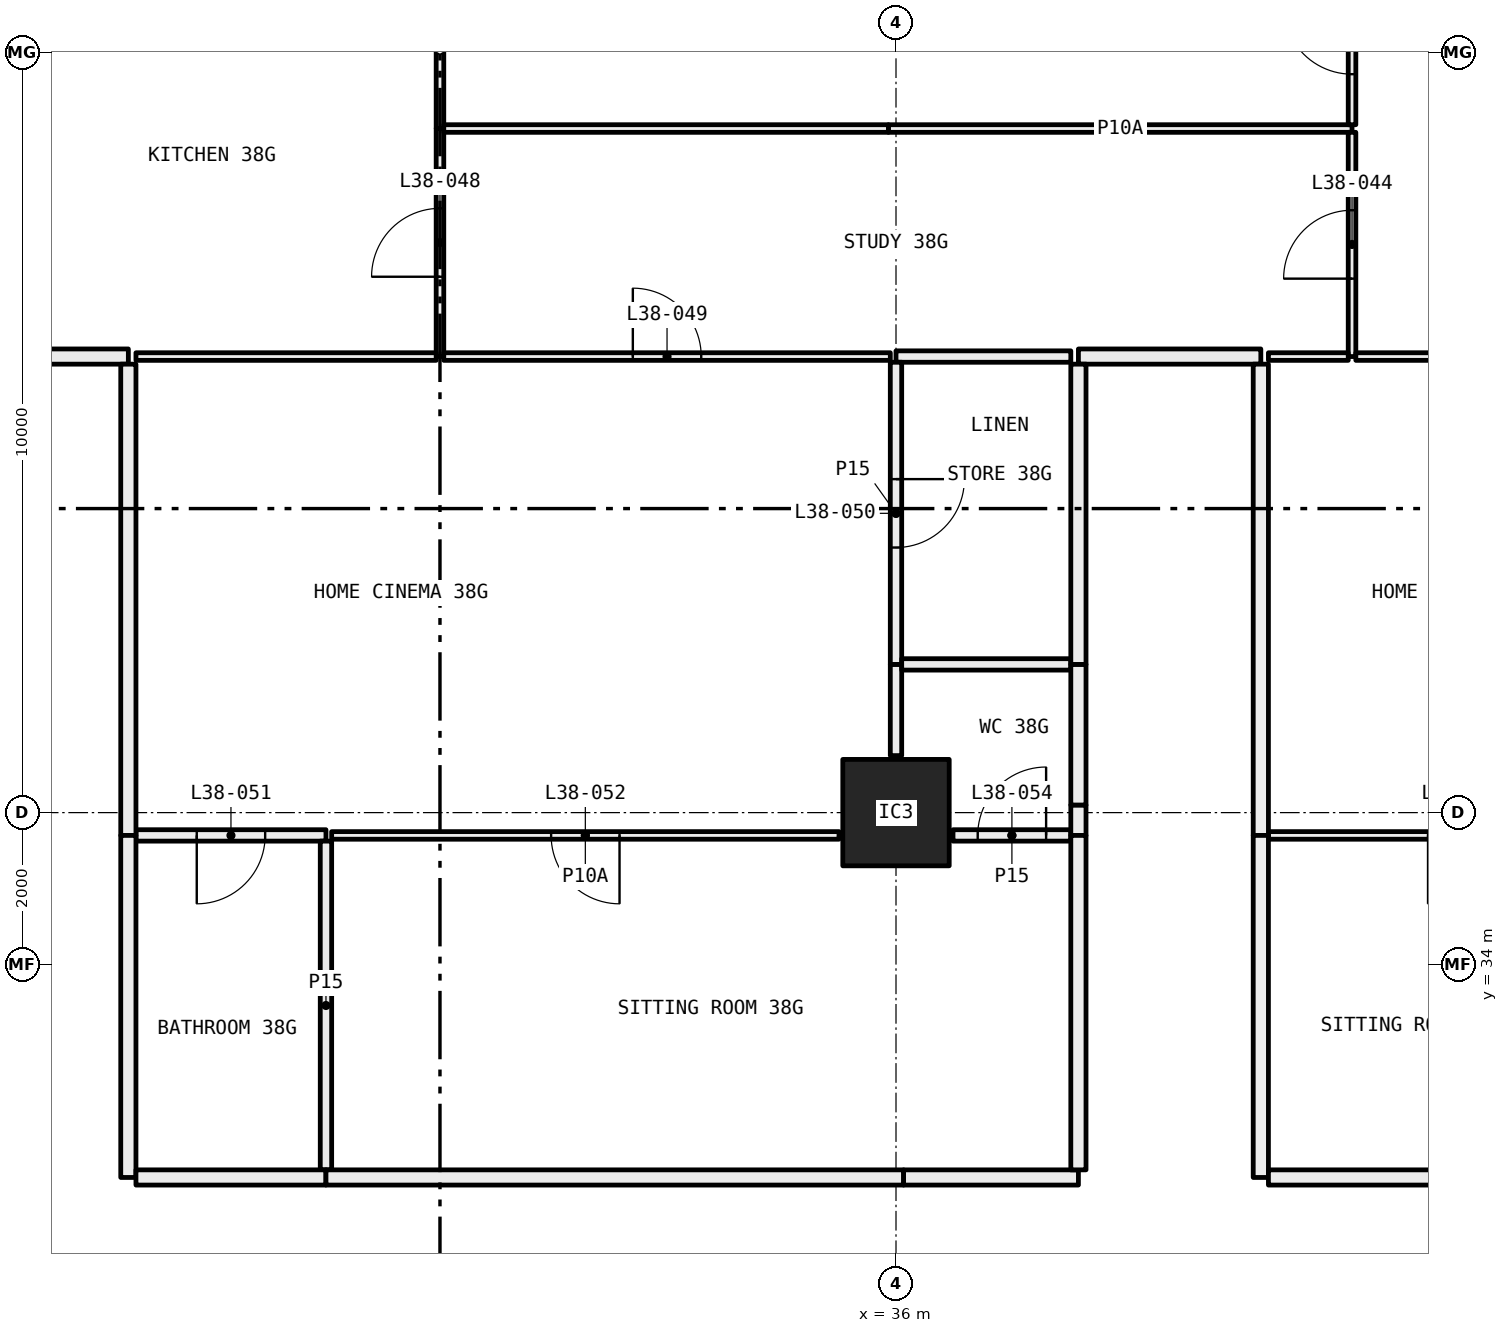
"""IFC4 building model, lengths in metres.
Left out: names, types, materials, properties, quantities, classifications, styles, units other than length and angle.
Written with IfcOpenShell. Run it as: python <this file> out.ifc"""

import sys

from ifc_helpers import new_model, si_unit, direction, frame, frame_2d, origin, origin_2d, place, context, subcontext, project, spatial, rectangle, hollow_rectangle, extrude, element, fill, save


model = new_model("IFC4")
c1 = context("Model", 3, precision=1e-05, world=origin(), true_north=direction((0.0, 1.0)))
c2 = subcontext(c1, "Body", "Model", "MODEL_VIEW")
j1 = project(units=[si_unit("LENGTHUNIT", "METRE"), si_unit("PLANEANGLEUNIT", "RADIAN")], contexts=[c1])
p1 = place(None, origin())
s1 = spatial("IfcSite", under=j1, at=p1, CompositionType="ELEMENT")
p2 = place(p1, origin())
s2 = spatial("IfcBuilding", under=s1, at=p2, CompositionType="ELEMENT")
p3 = place(p2, frame((0.0, 0.0, 144.9)))
s3 = spatial("IfcBuildingStorey", under=s2, at=p3, CompositionType="ELEMENT", Elevation=144.9)
p4 = place(p3, frame((36.0, 36.0, 0.0), z_axis=(0.0, 0.0, 1.0), x_axis=(1.0, 0.0, 0.0)))
e1 = element("IfcColumn", 1, at=p4, inside=s3, PredefinedType="COLUMN", context=c2, shape_type="SweptSolid", body=[
    extrude(hollow_rectangle(XDim=1.4, YDim=1.4, WallThickness=0.06, at=origin_2d()), origin(), (0.0, 0.0, 1.0), 3.05),
])
p5 = place(p3, frame((30.0, 42.0, 0.0), z_axis=(0.0, 0.0, 1.0), x_axis=(0.0, 1.0, 0.0)))
e2 = element("IfcWall", 2, at=p5, inside=s3, PredefinedType="PARTITIONING", context=c2, shape_type="SweptSolid", body=[
    extrude(rectangle(XDim=3.0, YDim=0.1, at=frame_2d((1.5, 0.0))), origin(), (0.0, 0.0, 1.0), 3.05),
])
p6 = place(p5, frame((1.05, 0.0, 0.0)))
e3 = element("IfcOpeningElement", 3, at=p6, cuts=e2, PredefinedType="OPENING", context=c2, shape_type="SweptSolid", body=[
    extrude(rectangle(XDim=0.9, YDim=2.1, at=frame_2d((0.45, 1.05))), frame((0.0, 0.06, 0.0), z_axis=(0.0, -1.0, 0.0), x_axis=(1.0, 0.0, 0.0)), (0.0, 0.0, 1.0), 0.12),
])
p7 = place(p3, frame((30.0, 45.0, 0.0), z_axis=(0.0, 0.0, 1.0), x_axis=(0.0, 1.0, 0.0)))
e4 = element("IfcWall", 4, at=p7, inside=s3, PredefinedType="PARTITIONING", context=c2, shape_type="SweptSolid", body=[
    extrude(rectangle(XDim=2.28, YDim=0.1, at=frame_2d((1.14, 0.0))), origin(), (0.0, 0.0, 1.0), 3.05),
])
p8 = place(p3, frame((26.0, 42.0, 0.0), z_axis=(0.0, 0.0, 1.0), x_axis=(1.0, 0.0, 0.0)))
e5 = element("IfcWall", 5, at=p8, inside=s3, PredefinedType="PARTITIONING", context=c2, shape_type="SweptSolid", body=[
    extrude(rectangle(XDim=3.95, YDim=0.1, at=frame_2d((1.975, 0.0))), origin(), (0.0, 0.0, 1.0), 3.05),
])
p9 = place(p3, frame((24.1, 42.0, 0.0), z_axis=(0.0, 0.0, 1.0), x_axis=(1.0, 0.0, 0.0)))
e6 = element("IfcWall", 6, at=p9, inside=s3, PredefinedType="PARTITIONING", context=c2, shape_type="SweptSolid", body=[
    extrude(rectangle(XDim=1.8, YDim=0.2, at=frame_2d((0.9, 0.0))), origin(), (0.0, 0.0, 1.0), 3.05),
])
p10 = place(p3, frame((42.0, 45.0, 0.0), z_axis=(0.0, 0.0, 1.0), x_axis=(-1.0, 0.0, 0.0)))
e7 = element("IfcWall", 7, at=p10, inside=s3, PredefinedType="PARTITIONING", context=c2, shape_type="SweptSolid", body=[
    extrude(rectangle(XDim=6.1, YDim=0.1, at=frame_2d((3.05, 0.0))), origin(), (0.0, 0.0, 1.0), 2.45),
])
p11 = place(p3, frame((35.9, 45.0, 0.0), z_axis=(0.0, 0.0, 1.0), x_axis=(-1.0, 0.0, 0.0)))
e8 = element("IfcWall", 8, at=p11, inside=s3, PredefinedType="PARTITIONING", context=c2, shape_type="SweptSolid", body=[
    extrude(rectangle(XDim=5.85, YDim=0.1, at=frame_2d((2.925, 0.0))), origin(), (0.0, 0.0, 1.0), 3.05),
])
p12 = place(p3, frame((42.0, 42.0, 0.0), z_axis=(0.0, 0.0, 1.0), x_axis=(0.0, 1.0, 0.0)))
e9 = element("IfcWall", 9, at=p12, inside=s3, PredefinedType="PARTITIONING", context=c2, shape_type="SweptSolid", body=[
    extrude(rectangle(XDim=2.95, YDim=0.1, at=frame_2d((1.475, 0.0))), origin(), (0.0, 0.0, 1.0), 3.05),
])
p13 = place(p12, frame((1.025, 0.0, 0.0)))
e10 = element("IfcOpeningElement", 10, at=p13, cuts=e9, PredefinedType="OPENING", context=c2, shape_type="SweptSolid", body=[
    extrude(rectangle(XDim=0.9, YDim=2.1, at=frame_2d((0.45, 1.05))), frame((0.0, 0.06, 0.0), z_axis=(0.0, -1.0, 0.0), x_axis=(1.0, 0.0, 0.0)), (0.0, 0.0, 1.0), 0.12),
])
p14 = place(p3, frame((30.05, 42.0, 0.0), z_axis=(0.0, 0.0, 1.0), x_axis=(1.0, 0.0, 0.0)))
e11 = element("IfcWall", 11, at=p14, inside=s3, PredefinedType="PARTITIONING", context=c2, shape_type="SweptSolid", body=[
    extrude(rectangle(XDim=5.875, YDim=0.1, at=frame_2d((2.938, 0.0))), origin(), (0.0, 0.0, 1.0), 2.45),
])
p15 = place(p14, frame((2.488, 0.0, 0.0)))
e12 = element("IfcOpeningElement", 12, at=p15, cuts=e11, PredefinedType="OPENING", context=c2, shape_type="SweptSolid", body=[
    extrude(rectangle(XDim=0.9, YDim=2.1, at=frame_2d((0.45, 1.05))), frame((0.0, 0.06, 0.0), z_axis=(0.0, -1.0, 0.0), x_axis=(1.0, 0.0, 0.0)), (0.0, 0.0, 1.0), 0.12),
])
p16 = place(p3, frame((36.0, 42.0, 0.0), z_axis=(0.0, 0.0, 1.0), x_axis=(1.0, 0.0, 0.0)))
e13 = element("IfcWall", 13, at=p16, inside=s3, PredefinedType="PARTITIONING", context=c2, shape_type="SweptSolid", body=[
    extrude(rectangle(XDim=2.3, YDim=0.15, at=frame_2d((1.15, 0.0))), origin(), (0.0, 0.0, 1.0), 2.45),
])
p17 = place(p3, frame((40.9, 42.0, 0.0), z_axis=(0.0, 0.0, 1.0), x_axis=(1.0, 0.0, 0.0)))
e14 = element("IfcWall", 14, at=p17, inside=s3, PredefinedType="PARTITIONING", context=c2, shape_type="SweptSolid", body=[
    extrude(rectangle(XDim=1.05, YDim=0.1, at=frame_2d((0.525, 0.0))), origin(), (0.0, 0.0, 1.0), 3.05),
])
p18 = place(p3, frame((38.4, 42.0, 0.0), z_axis=(0.0, 0.0, 1.0), x_axis=(1.0, 0.0, 0.0)))
e15 = element("IfcWall", 15, at=p18, inside=s3, PredefinedType="PARTITIONING", context=c2, shape_type="SweptSolid", body=[
    extrude(rectangle(XDim=2.4, YDim=0.2, at=frame_2d((1.2, 0.0))), origin(), (0.0, 0.0, 1.0), 3.05),
])
p19 = place(p3, frame((42.0, 45.05, 0.0), z_axis=(0.0, 0.0, 1.0), x_axis=(0.0, 1.0, 0.0)))
e16 = element("IfcWall", 16, at=p19, inside=s3, PredefinedType="PARTITIONING", context=c2, shape_type="SweptSolid", body=[
    extrude(rectangle(XDim=2.23, YDim=0.1, at=frame_2d((1.115, 0.0))), origin(), (0.0, 0.0, 1.0), 3.05),
])
p20 = place(p19, frame((0.665, 0.0, 0.0)))
e17 = element("IfcOpeningElement", 17, at=p20, cuts=e16, PredefinedType="OPENING", context=c2, shape_type="SweptSolid", body=[
    extrude(rectangle(XDim=0.9, YDim=2.1, at=frame_2d((0.45, 1.05))), frame((0.0, 0.06, 0.0), z_axis=(0.0, -1.0, 0.0), x_axis=(1.0, 0.0, 0.0)), (0.0, 0.0, 1.0), 0.12),
])
p21 = place(p3, frame((42.05, 42.0, 0.0), z_axis=(0.0, 0.0, 1.0), x_axis=(1.0, 0.0, 0.0)))
e18 = element("IfcWall", 18, at=p21, inside=s3, PredefinedType="PARTITIONING", context=c2, shape_type="SweptSolid", body=[
    extrude(rectangle(XDim=3.95, YDim=0.1, at=frame_2d((1.975, 0.0))), origin(), (0.0, 0.0, 1.0), 3.05),
])
p22 = place(p21, frame((1.525, 0.0, 0.0)))
e19 = element("IfcOpeningElement", 19, at=p22, cuts=e18, PredefinedType="OPENING", context=c2, shape_type="SweptSolid", body=[
    extrude(rectangle(XDim=0.9, YDim=2.1, at=frame_2d((0.45, 1.05))), frame((0.0, 0.06, 0.0), z_axis=(0.0, -1.0, 0.0), x_axis=(1.0, 0.0, 0.0)), (0.0, 0.0, 1.0), 0.12),
])
p23 = place(p3, frame((36.0, 36.75, 0.0), z_axis=(0.0, 0.0, 1.0), x_axis=(0.0, 1.0, 0.0)))
e20 = element("IfcWall", 20, at=p23, inside=s3, PredefinedType="PARTITIONING", context=c2, shape_type="SweptSolid", body=[
    extrude(rectangle(XDim=1.2, YDim=0.15, at=frame_2d((0.6, 0.0))), origin(), (0.0, 0.0, 1.0), 2.45),
])
p24 = place(p3, frame((36.0, 37.95, 0.0), z_axis=(0.0, 0.0, 1.0), x_axis=(0.0, 1.0, 0.0)))
e21 = element("IfcWall", 21, at=p24, inside=s3, PredefinedType="PARTITIONING", context=c2, shape_type="SweptSolid", body=[
    extrude(rectangle(XDim=3.975, YDim=0.15, at=frame_2d((1.988, 0.0))), origin(), (0.0, 0.0, 1.0), 2.45),
])
p25 = place(p24, frame((1.538, 0.0, 0.0)))
e22 = element("IfcOpeningElement", 22, at=p25, cuts=e21, PredefinedType="OPENING", context=c2, shape_type="SweptSolid", body=[
    extrude(rectangle(XDim=0.9, YDim=2.1, at=frame_2d((0.45, 1.05))), frame((0.0, 0.085, 0.0), z_axis=(0.0, -1.0, 0.0), x_axis=(1.0, 0.0, 0.0)), (0.0, 0.0, 1.0), 0.17),
])
p26 = place(p3, frame((26.0, 35.7, 0.0), z_axis=(0.0, 0.0, 1.0), x_axis=(1.0, 0.0, 0.0)))
e23 = element("IfcWall", 23, at=p26, inside=s3, PredefinedType="PARTITIONING", context=c2, shape_type="SweptSolid", body=[
    extrude(rectangle(XDim=2.5, YDim=0.15, at=frame_2d((1.25, 0.0))), origin(), (0.0, 0.0, 1.0), 3.05),
])
p27 = place(p26, frame((0.8, 0.0, 0.0)))
e24 = element("IfcOpeningElement", 24, at=p27, cuts=e23, PredefinedType="OPENING", context=c2, shape_type="SweptSolid", body=[
    extrude(rectangle(XDim=0.9, YDim=2.1, at=frame_2d((0.45, 1.05))), frame((0.0, 0.085, 0.0), z_axis=(0.0, -1.0, 0.0), x_axis=(1.0, 0.0, 0.0)), (0.0, 0.0, 1.0), 0.17),
])
p28 = place(p3, frame((28.575, 35.7, 0.0), z_axis=(0.0, 0.0, 1.0), x_axis=(1.0, 0.0, 0.0)))
e25 = element("IfcWall", 25, at=p28, inside=s3, PredefinedType="PARTITIONING", context=c2, shape_type="SweptSolid", body=[
    extrude(rectangle(XDim=6.675, YDim=0.1, at=frame_2d((3.337, 0.0))), origin(), (0.0, 0.0, 1.0), 3.05),
])
p29 = place(p28, frame((2.887, 0.0, 0.0)))
e26 = element("IfcOpeningElement", 26, at=p29, cuts=e25, PredefinedType="OPENING", context=c2, shape_type="SweptSolid", body=[
    extrude(rectangle(XDim=0.9, YDim=2.1, at=frame_2d((0.45, 1.05))), frame((0.0, 0.06, 0.0), z_axis=(0.0, -1.0, 0.0), x_axis=(1.0, 0.0, 0.0)), (0.0, 0.0, 1.0), 0.12),
])
p30 = place(p3, frame((25.9, 41.9, 0.0), z_axis=(0.0, 0.0, 1.0), x_axis=(0.0, -1.0, 0.0)))
e27 = element("IfcWall", 27, at=p30, inside=s3, PredefinedType="PARTITIONING", context=c2, shape_type="SweptSolid", body=[
    extrude(rectangle(XDim=6.2, YDim=0.2, at=frame_2d((3.1, 0.0))), origin(), (0.0, 0.0, 1.0), 2.45),
])
p31 = place(p3, frame((38.3, 37.95, 0.0), z_axis=(0.0, 0.0, 1.0), x_axis=(-1.0, 0.0, 0.0)))
e28 = element("IfcWall", 28, at=p31, inside=s3, PredefinedType="PARTITIONING", context=c2, shape_type="SweptSolid", body=[
    extrude(rectangle(XDim=2.225, YDim=0.15, at=frame_2d((1.113, 0.0))), origin(), (0.0, 0.0, 1.0), 2.45),
])
p32 = place(p3, frame((36.75, 35.7, 0.0), z_axis=(0.0, 0.0, 1.0), x_axis=(1.0, 0.0, 0.0)))
e29 = element("IfcWall", 29, at=p32, inside=s3, PredefinedType="PARTITIONING", context=c2, shape_type="SweptSolid", body=[
    extrude(rectangle(XDim=1.55, YDim=0.15, at=frame_2d((0.775, 0.0))), origin(), (0.0, 0.0, 1.0), 3.05),
])
p33 = place(p32, frame((0.325, 0.0, 0.0)))
e30 = element("IfcOpeningElement", 30, at=p33, cuts=e29, PredefinedType="OPENING", context=c2, shape_type="SweptSolid", body=[
    extrude(rectangle(XDim=0.9, YDim=2.1, at=frame_2d((0.45, 1.05))), frame((0.0, 0.085, 0.0), z_axis=(0.0, -1.0, 0.0), x_axis=(1.0, 0.0, 0.0)), (0.0, 0.0, 1.0), 0.17),
])
p34 = place(p3, frame((38.4, 35.7, 0.0), z_axis=(0.0, 0.0, 1.0), x_axis=(0.0, 1.0, 0.0)))
e31 = element("IfcWall", 31, at=p34, inside=s3, PredefinedType="PARTITIONING", context=c2, shape_type="SweptSolid", body=[
    extrude(rectangle(XDim=0.4, YDim=0.2, at=frame_2d((0.2, 0.0))), origin(), (0.0, 0.0, 1.0), 2.45),
])
p35 = place(p3, frame((38.4, 36.1, 0.0), z_axis=(0.0, 0.0, 1.0), x_axis=(0.0, 1.0, 0.0)))
e32 = element("IfcWall", 32, at=p35, inside=s3, PredefinedType="PARTITIONING", context=c2, shape_type="SweptSolid", body=[
    extrude(rectangle(XDim=1.85, YDim=0.2, at=frame_2d((0.925, 0.0))), origin(), (0.0, 0.0, 1.0), 3.05),
])
p36 = place(p3, frame((38.4, 37.95, 0.0), z_axis=(0.0, 0.0, 1.0), x_axis=(0.0, 1.0, 0.0)))
e33 = element("IfcWall", 33, at=p36, inside=s3, PredefinedType="PARTITIONING", context=c2, shape_type="SweptSolid", body=[
    extrude(rectangle(XDim=3.95, YDim=0.2, at=frame_2d((1.975, 0.0))), origin(), (0.0, 0.0, 1.0), 3.05),
])
p37 = place(p3, frame((28.5, 31.3, 0.0), z_axis=(0.0, 0.0, 1.0), x_axis=(0.0, 1.0, 0.0)))
e34 = element("IfcWall", 34, at=p37, inside=s3, PredefinedType="PARTITIONING", context=c2, shape_type="SweptSolid", body=[
    extrude(rectangle(XDim=4.325, YDim=0.15, at=frame_2d((2.163, 0.0))), origin(), (0.0, 0.0, 1.0), 3.05),
])
p38 = place(p3, frame((25.9, 35.7, 0.0), z_axis=(0.0, 0.0, 1.0), x_axis=(0.0, -1.0, 0.0)))
e35 = element("IfcWall", 35, at=p38, inside=s3, PredefinedType="PARTITIONING", context=c2, shape_type="SweptSolid", body=[
    extrude(rectangle(XDim=4.5, YDim=0.2, at=frame_2d((2.25, 0.0))), origin(), (0.0, 0.0, 1.0), 3.05),
])
p39 = place(p3, frame((26.0, 31.2, 0.0), z_axis=(0.0, 0.0, 1.0), x_axis=(1.0, 0.0, 0.0)))
e36 = element("IfcWall", 36, at=p39, inside=s3, PredefinedType="PARTITIONING", context=c2, shape_type="SweptSolid", body=[
    extrude(rectangle(XDim=2.5, YDim=0.2, at=frame_2d((1.25, 0.0))), origin(), (0.0, 0.0, 1.0), 3.05),
])
p40 = place(p3, frame((28.5, 31.2, 0.0), z_axis=(0.0, 0.0, 1.0), x_axis=(1.0, 0.0, 0.0)))
e37 = element("IfcWall", 37, at=p40, inside=s3, PredefinedType="PARTITIONING", context=c2, shape_type="SweptSolid", body=[
    extrude(rectangle(XDim=7.6, YDim=0.2, at=frame_2d((3.8, 0.0))), origin(), (0.0, 0.0, 1.0), 2.45),
])
p41 = place(p3, frame((36.1, 31.2, 0.0), z_axis=(0.0, 0.0, 1.0), x_axis=(1.0, 0.0, 0.0)))
e38 = element("IfcWall", 38, at=p41, inside=s3, PredefinedType="PARTITIONING", context=c2, shape_type="SweptSolid", body=[
    extrude(rectangle(XDim=2.3, YDim=0.2, at=frame_2d((1.15, 0.0))), origin(), (0.0, 0.0, 1.0), 3.05),
])
p42 = place(p3, frame((38.4, 31.3, 0.0), z_axis=(0.0, 0.0, 1.0), x_axis=(0.0, 1.0, 0.0)))
e39 = element("IfcWall", 39, at=p42, inside=s3, PredefinedType="PARTITIONING", context=c2, shape_type="SweptSolid", body=[
    extrude(rectangle(XDim=4.4, YDim=0.2, at=frame_2d((2.2, 0.0))), origin(), (0.0, 0.0, 1.0), 3.05),
])
p43 = place(p3, frame((40.9, 35.7, 0.0), z_axis=(0.0, 0.0, 1.0), x_axis=(1.0, 0.0, 0.0)))
e40 = element("IfcWall", 40, at=p43, inside=s3, PredefinedType="PARTITIONING", context=c2, shape_type="SweptSolid", body=[
    extrude(rectangle(XDim=5.1, YDim=0.1, at=frame_2d((2.55, 0.0))), origin(), (0.0, 0.0, 1.0), 3.05),
])
p44 = place(p43, frame((2.1, 0.0, 0.0)))
e41 = element("IfcOpeningElement", 41, at=p44, cuts=e40, PredefinedType="OPENING", context=c2, shape_type="SweptSolid", body=[
    extrude(rectangle(XDim=0.9, YDim=2.1, at=frame_2d((0.45, 1.05))), frame((0.0, 0.06, 0.0), z_axis=(0.0, -1.0, 0.0), x_axis=(1.0, 0.0, 0.0)), (0.0, 0.0, 1.0), 0.12),
])
p45 = place(p3, frame((40.8, 41.9, 0.0), z_axis=(0.0, 0.0, 1.0), x_axis=(0.0, -1.0, 0.0)))
e42 = element("IfcWall", 42, at=p45, inside=s3, PredefinedType="PARTITIONING", context=c2, shape_type="SweptSolid", body=[
    extrude(rectangle(XDim=6.2, YDim=0.2, at=frame_2d((3.1, 0.0))), origin(), (0.0, 0.0, 1.0), 2.45),
])
p46 = place(p3, frame((40.8, 35.7, 0.0), z_axis=(0.0, 0.0, 1.0), x_axis=(0.0, -1.0, 0.0)))
e43 = element("IfcWall", 43, at=p46, inside=s3, PredefinedType="PARTITIONING", context=c2, shape_type="SweptSolid", body=[
    extrude(rectangle(XDim=4.5, YDim=0.2, at=frame_2d((2.25, 0.0))), origin(), (0.0, 0.0, 1.0), 3.05),
])
p47 = place(p3, frame((40.9, 31.2, 0.0), z_axis=(0.0, 0.0, 1.0), x_axis=(1.0, 0.0, 0.0)))
e44 = element("IfcWall", 44, at=p47, inside=s3, PredefinedType="PARTITIONING", context=c2, shape_type="SweptSolid", body=[
    extrude(rectangle(XDim=5.2, YDim=0.2, at=frame_2d((2.6, 0.0))), origin(), (0.0, 0.0, 1.0), 3.05),
])
p48 = place(p13, origin())
e45 = element("IfcDoor", 45, at=p48, inside=s3, OperationType="SINGLE_SWING_RIGHT", PredefinedType="DOOR", context=c2, shape_type="SweptSolid", body=[
    extrude(rectangle(XDim=0.9, YDim=2.1, at=frame_2d((0.45, 1.05))), frame((0.0, 0.025, 0.0), z_axis=(0.0, -1.0, 0.0), x_axis=(1.0, 0.0, 0.0)), (0.0, 0.0, 1.0), 0.05),
])
fill(e10, e45)
p49 = place(p20, origin())
e46 = element("IfcDoor", 46, at=p49, inside=s3, OperationType="SINGLE_SWING_LEFT", PredefinedType="DOOR", context=c2, shape_type="SweptSolid", body=[
    extrude(rectangle(XDim=0.9, YDim=2.1, at=frame_2d((0.45, 1.05))), frame((0.0, 0.025, 0.0), z_axis=(0.0, -1.0, 0.0), x_axis=(1.0, 0.0, 0.0)), (0.0, 0.0, 1.0), 0.05),
])
fill(e17, e46)
p50 = place(p6, origin())
e47 = element("IfcDoor", 47, at=p50, inside=s3, OperationType="SINGLE_SWING_RIGHT", PredefinedType="DOOR", context=c2, shape_type="SweptSolid", body=[
    extrude(rectangle(XDim=0.9, YDim=2.1, at=frame_2d((0.45, 1.05))), frame((0.0, 0.025, 0.0), z_axis=(0.0, -1.0, 0.0), x_axis=(1.0, 0.0, 0.0)), (0.0, 0.0, 1.0), 0.05),
])
fill(e3, e47)
p51 = place(p15, origin())
e48 = element("IfcDoor", 48, at=p51, inside=s3, OperationType="SINGLE_SWING_RIGHT", PredefinedType="DOOR", context=c2, shape_type="SweptSolid", body=[
    extrude(rectangle(XDim=0.9, YDim=2.1, at=frame_2d((0.45, 1.05))), frame((0.0, 0.025, 0.0), z_axis=(0.0, -1.0, 0.0), x_axis=(1.0, 0.0, 0.0)), (0.0, 0.0, 1.0), 0.05),
])
fill(e12, e48)
p52 = place(p25, frame((0.9, 0.0, 0.0), x_axis=(-1.0, 0.0, 0.0)))
e49 = element("IfcDoor", 49, at=p52, inside=s3, OperationType="SINGLE_SWING_RIGHT", PredefinedType="DOOR", context=c2, shape_type="SweptSolid", body=[
    extrude(rectangle(XDim=0.9, YDim=2.1, at=frame_2d((0.45, 1.05))), frame((0.0, 0.025, 0.0), z_axis=(0.0, -1.0, 0.0), x_axis=(1.0, 0.0, 0.0)), (0.0, 0.0, 1.0), 0.05),
])
fill(e22, e49)
p53 = place(p27, frame((0.9, 0.0, 0.0), x_axis=(-1.0, 0.0, 0.0)))
e50 = element("IfcDoor", 50, at=p53, inside=s3, OperationType="SINGLE_SWING_LEFT", PredefinedType="DOOR", context=c2, shape_type="SweptSolid", body=[
    extrude(rectangle(XDim=0.9, YDim=2.1, at=frame_2d((0.45, 1.05))), frame((0.0, 0.025, 0.0), z_axis=(0.0, -1.0, 0.0), x_axis=(1.0, 0.0, 0.0)), (0.0, 0.0, 1.0), 0.05),
])
fill(e24, e50)
p54 = place(p29, frame((0.9, 0.0, 0.0), x_axis=(-1.0, 0.0, 0.0)))
e51 = element("IfcDoor", 51, at=p54, inside=s3, OperationType="SINGLE_SWING_RIGHT", PredefinedType="DOOR", context=c2, shape_type="SweptSolid", body=[
    extrude(rectangle(XDim=0.9, YDim=2.1, at=frame_2d((0.45, 1.05))), frame((0.0, 0.025, 0.0), z_axis=(0.0, -1.0, 0.0), x_axis=(1.0, 0.0, 0.0)), (0.0, 0.0, 1.0), 0.05),
])
fill(e26, e51)
p55 = place(p33, origin())
e52 = element("IfcDoor", 52, at=p55, inside=s3, OperationType="SINGLE_SWING_LEFT", PredefinedType="DOOR", context=c2, shape_type="SweptSolid", body=[
    extrude(rectangle(XDim=0.9, YDim=2.1, at=frame_2d((0.45, 1.05))), frame((0.0, 0.025, 0.0), z_axis=(0.0, -1.0, 0.0), x_axis=(1.0, 0.0, 0.0)), (0.0, 0.0, 1.0), 0.05),
])
fill(e30, e52)
save(model, sys.argv[1])
